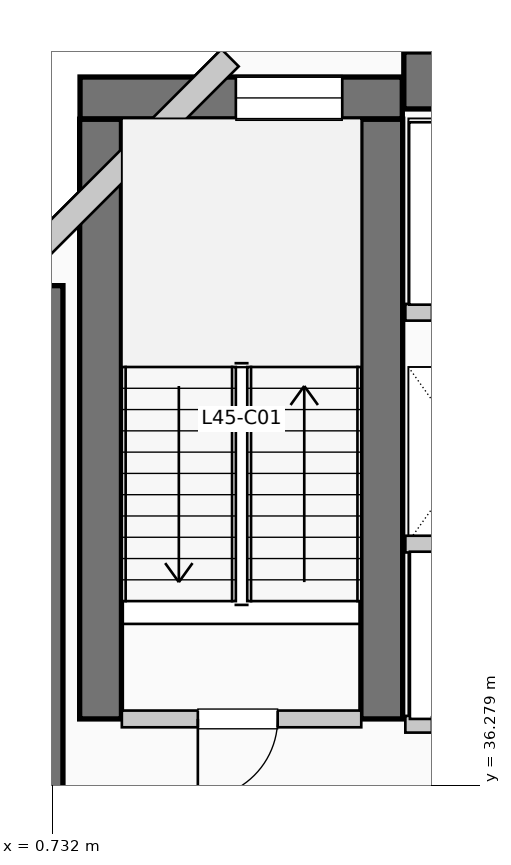
"""IFC4 building model, lengths in metres.
Left out: names, types, materials, properties, quantities, classifications, styles, units other than length and angle.
Written with IfcOpenShell. Run it as: python <this file> out.ifc"""

import sys

from ifc_helpers import new_model, si_unit, direction, frame, frame_2d, origin, place, context, subcontext, project, spatial, rectangle, extrude, element, fill, save


model = new_model("IFC4")
c1 = context("Model", 3, precision=1e-05, world=origin(), true_north=direction((0.0, 1.0)))
c2 = subcontext(c1, "Body", "Model", "MODEL_VIEW")
j1 = project(units=[si_unit("LENGTHUNIT", "METRE"), si_unit("PLANEANGLEUNIT", "RADIAN")], contexts=[c1])
p1 = place(None, origin())
s1 = spatial("IfcSite", under=j1, at=p1, CompositionType="ELEMENT")
p2 = place(p1, origin())
s2 = spatial("IfcBuilding", under=s1, at=p2, CompositionType="ELEMENT")
p3 = place(p2, frame((0.0, 0.0, 187.44)))
s3 = spatial("IfcBuildingStorey", under=s2, at=p3, CompositionType="ELEMENT", Elevation=187.44)
p4 = place(p3, frame((5.36, 45.55, 0.0), z_axis=(0.0, 0.0, 1.0), x_axis=(1.0, 0.0, 0.0)))
e1 = element("IfcWall", 1, at=p4, inside=s3, PredefinedType="SHEAR", context=c2, shape_type="SweptSolid", body=[
    extrude(rectangle(XDim=13.98, YDim=0.75, at=frame_2d((6.99, 0.0))), origin(), (0.0, 0.0, 1.0), 3.96),
])
p5 = place(p3, frame((0.5, 34.95, 0.0), z_axis=(0.0, 0.0, 1.0), x_axis=(0.0, 1.0, 0.0)))
e2 = element("IfcWall", 2, at=p5, inside=s3, PredefinedType="SHEAR", context=c2, shape_type="SweptSolid", body=[
    extrude(rectangle(XDim=7.9, YDim=0.75, at=frame_2d((3.95, 0.0))), origin(), (0.0, 0.0, 1.0), 3.96),
])
for number, where, z_axis, x_axis in (
    (3, (1.37, 37.15, 0.0), (0.0, 0.0, 1.0), (0.0, 1.0, 0.0)),
    (4, (5.07, 37.15, 0.0), (0.0, 0.0, 1.0), (0.0, 1.0, 0.0)),
):
    element("IfcWall", number, at=place(p3, frame(where, z_axis=z_axis, x_axis=x_axis)), inside=s3, PredefinedType="SHEAR", context=c2, shape_type="SweptSolid", body=[
        extrude(rectangle(XDim=7.89, YDim=0.55, at=frame_2d((3.945, 0.0))), origin(), (0.0, 0.0, 1.0), 3.96),
    ])
p6 = place(p3, frame((1.1, 45.32, 0.0), z_axis=(0.0, 0.0, 1.0), x_axis=(1.0, 0.0, 0.0)))
e5 = element("IfcWall", 5, at=p6, inside=s3, PredefinedType="SHEAR", context=c2, shape_type="SweptSolid", body=[
    extrude(rectangle(XDim=4.24, YDim=0.55, at=frame_2d((2.12, 0.0))), origin(), (0.0, 0.0, 1.0), 3.96),
])
p7 = place(p6, frame((2.05, 0.0, 1.05)))
e6 = element("IfcOpeningElement", 6, at=p7, cuts=e5, PredefinedType="OPENING", context=c2, shape_type="SweptSolid", body=[
    extrude(rectangle(XDim=1.4, YDim=1.8, at=frame_2d((0.7, 0.9))), frame((0.0, 0.285, 0.0), z_axis=(0.0, -1.0, 0.0), x_axis=(1.0, 0.0, 0.0)), (0.0, 0.0, 1.0), 0.57),
])
p8 = place(p3, frame((3.074, 45.848, 0.0), z_axis=(0.0, 0.0, 1.0), x_axis=(-0.707106781187, -0.707106781187, 0.0)))
e7 = element("IfcWall", 7, at=p8, inside=s3, PredefinedType="SOLIDWALL", context=c2, shape_type="SweptSolid", body=[
    extrude(rectangle(XDim=4.133, YDim=0.32, at=frame_2d((2.066, 0.0))), origin(), (0.0, 0.0, 1.0), 3.71),
])
p9 = place(p3, frame((1.65, 37.15, 0.0), z_axis=(0.0, 0.0, 1.0), x_axis=(1.0, 0.0, 0.0)))
e8 = element("IfcWall", 8, at=p9, inside=s3, PredefinedType="PARTITIONING", context=c2, shape_type="SweptSolid", body=[
    extrude(rectangle(XDim=3.15, YDim=0.22, at=frame_2d((1.575, 0.0))), origin(), (0.0, 0.0, 1.0), 3.71),
])
p10 = place(p9, frame((2.05, 0.0, 0.0), z_axis=(0.0, 0.0, 1.0), x_axis=(-1.0, 0.0, 0.0)))
e9 = element("IfcOpeningElement", 9, at=p10, cuts=e8, PredefinedType="OPENING", context=c2, shape_type="SweptSolid", body=[
    extrude(rectangle(XDim=1.05, YDim=2.15, at=frame_2d((0.525, 1.075))), frame((0.0, 0.12, 0.0), z_axis=(0.0, -1.0, 0.0), x_axis=(1.0, 0.0, 0.0)), (0.0, 0.0, 1.0), 0.24),
])
p11 = place(p3, frame((5.38, 37.08, 0.0), z_axis=(0.0, 0.0, 1.0), x_axis=(1.0, 0.0, 0.0)))
e10 = element("IfcWall", 10, at=p11, inside=s3, PredefinedType="PARTITIONING", context=c2, shape_type="SweptSolid", body=[
    extrude(rectangle(XDim=3.46, YDim=0.22, at=frame_2d((1.73, 0.0))), origin(), (0.0, 0.0, 1.0), 3.71),
])
p12 = place(p11, frame((1.55, 0.0, 0.0), z_axis=(0.0, 0.0, 1.0), x_axis=(-1.0, 0.0, 0.0)))
e11 = element("IfcOpeningElement", 11, at=p12, cuts=e10, PredefinedType="OPENING", context=c2, shape_type="SweptSolid", body=[
    extrude(rectangle(XDim=1.2, YDim=2.2, at=frame_2d((0.6, 1.1))), frame((0.0, 0.12, 0.0), z_axis=(0.0, -1.0, 0.0), x_axis=(1.0, 0.0, 0.0)), (0.0, 0.0, 1.0), 0.24),
])
p13 = place(p11, frame((3.22, 0.0, 0.0), z_axis=(0.0, 0.0, 1.0), x_axis=(-1.0, 0.0, 0.0)))
e12 = element("IfcOpeningElement", 12, at=p13, cuts=e10, PredefinedType="OPENING", context=c2, shape_type="SweptSolid", body=[
    extrude(rectangle(XDim=1.2, YDim=2.2, at=frame_2d((0.6, 1.1))), frame((0.0, 0.12, 0.0), z_axis=(0.0, -1.0, 0.0), x_axis=(1.0, 0.0, 0.0)), (0.0, 0.0, 1.0), 0.24),
])
p14 = place(p3, frame((5.38, 39.45, 0.0), z_axis=(0.0, 0.0, 1.0), x_axis=(1.0, 0.0, 0.0)))
e13 = element("IfcWall", 13, at=p14, inside=s3, PredefinedType="PARTITIONING", context=c2, shape_type="SweptSolid", body=[
    extrude(rectangle(XDim=3.46, YDim=0.22, at=frame_2d((1.73, 0.0))), origin(), (0.0, 0.0, 1.0), 3.71),
])
p15 = place(p3, frame((5.38, 42.5, 0.0), z_axis=(0.0, 0.0, 1.0), x_axis=(1.0, 0.0, 0.0)))
e14 = element("IfcWall", 14, at=p15, inside=s3, PredefinedType="PARTITIONING", context=c2, shape_type="SweptSolid", body=[
    extrude(rectangle(XDim=3.77, YDim=0.22, at=frame_2d((1.885, 0.0))), origin(), (0.0, 0.0, 1.0), 3.71),
])
p16 = place(p15, frame((1.75, 0.0, 0.0), z_axis=(0.0, 0.0, 1.0), x_axis=(-1.0, 0.0, 0.0)))
e15 = element("IfcOpeningElement", 15, at=p16, cuts=e14, PredefinedType="OPENING", context=c2, shape_type="SweptSolid", body=[
    extrude(rectangle(XDim=1.4, YDim=2.2, at=frame_2d((0.7, 1.1))), frame((0.0, 0.12, 0.0), z_axis=(0.0, -1.0, 0.0), x_axis=(1.0, 0.0, 0.0)), (0.0, 0.0, 1.0), 0.24),
])
p17 = place(p15, frame((3.53, 0.0, 0.0), z_axis=(0.0, 0.0, 1.0), x_axis=(-1.0, 0.0, 0.0)))
e16 = element("IfcOpeningElement", 16, at=p17, cuts=e14, PredefinedType="OPENING", context=c2, shape_type="SweptSolid", body=[
    extrude(rectangle(XDim=1.4, YDim=2.2, at=frame_2d((0.7, 1.1))), frame((0.0, 0.12, 0.0), z_axis=(0.0, -1.0, 0.0), x_axis=(1.0, 0.0, 0.0)), (0.0, 0.0, 1.0), 0.24),
])
p18 = place(p7, origin())
e17 = element("IfcWindow", 17, at=p18, inside=s3, PartitioningType="SINGLE_PANEL", PredefinedType="WINDOW", context=c2, shape_type="SweptSolid", body=[
    extrude(rectangle(XDim=1.4, YDim=1.8, at=frame_2d((0.7, 0.9))), frame((0.0, 0.03, 0.0), z_axis=(0.0, -1.0, 0.0), x_axis=(1.0, 0.0, 0.0)), (0.0, 0.0, 1.0), 0.06),
])
fill(e6, e17)
p19 = place(p10, origin())
e18 = element("IfcDoor", 18, at=p19, inside=s3, OperationType="SINGLE_SWING_LEFT", PredefinedType="DOOR", context=c2, shape_type="SweptSolid", body=[
    extrude(rectangle(XDim=1.05, YDim=2.15, at=frame_2d((0.525, 1.075))), frame((0.0, 0.025, 0.0), z_axis=(0.0, -1.0, 0.0), x_axis=(1.0, 0.0, 0.0)), (0.0, 0.0, 1.0), 0.05),
])
fill(e9, e18)
save(model, sys.argv[1])
